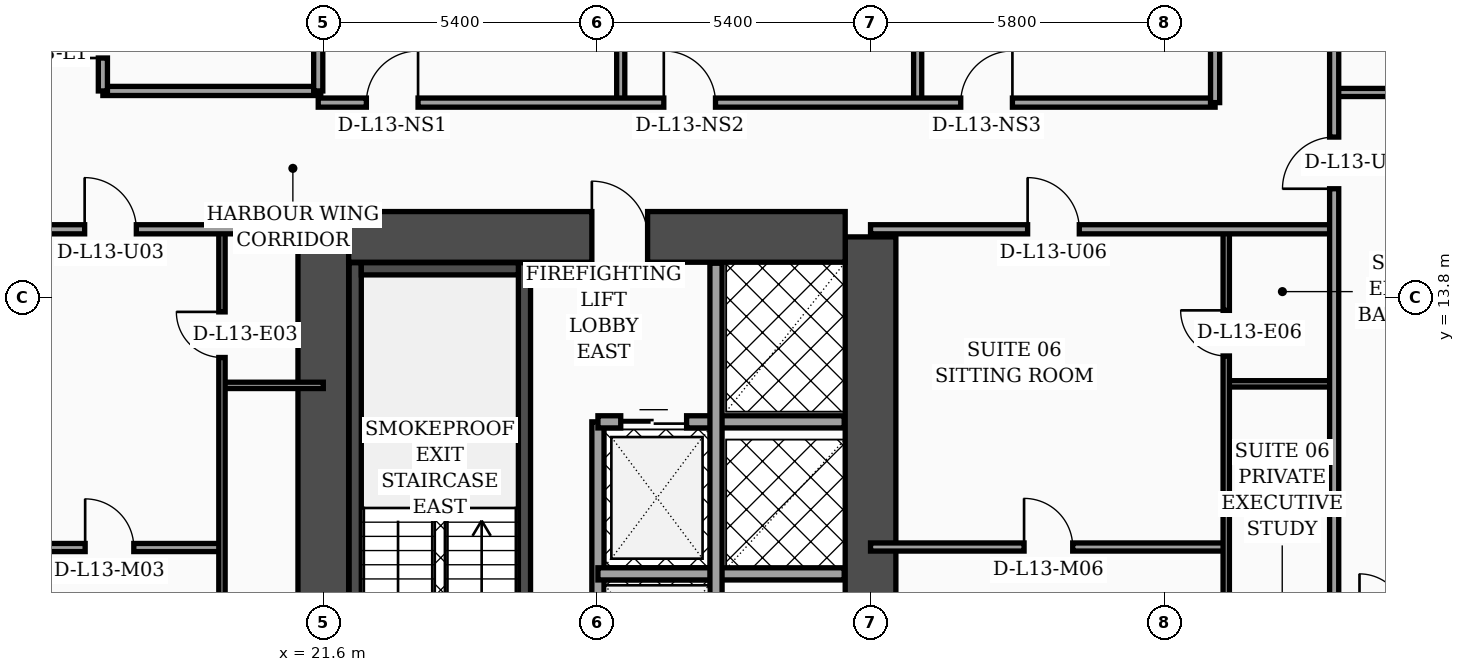
"""IFC4 building model, lengths in metres.
Left out: names, types, materials, properties, quantities, classifications, styles, units other than length and angle.
Written with IfcOpenShell. Run it as: python <this file> out.ifc"""

import sys

from ifc_helpers import new_model, si_unit, direction, frame, frame_2d, origin, place, context, subcontext, project, spatial, rectangle, extrude, element, fill, save


model = new_model("IFC4")
c1 = context("Model", 3, precision=1e-05, world=origin(), true_north=direction((0.0, 1.0)))
c2 = subcontext(c1, "Body", "Model", "MODEL_VIEW")
j1 = project(units=[si_unit("LENGTHUNIT", "METRE"), si_unit("PLANEANGLEUNIT", "RADIAN")], contexts=[c1])
p1 = place(None, origin())
s1 = spatial("IfcSite", under=j1, at=p1, CompositionType="ELEMENT")
p2 = place(p1, origin())
s2 = spatial("IfcBuilding", under=s1, at=p2, CompositionType="ELEMENT")
p3 = place(p2, frame((0.0, 0.0, 58.4)))
s3 = spatial("IfcBuildingStorey", under=s2, at=p3, CompositionType="ELEMENT", Elevation=58.4)
for number, where, z_axis, x_axis in (
    (1, (21.6, 4.6, 0.0), (0.0, 0.0, 1.0), (0.0, 1.0, 0.0)),
    (2, (32.4, 4.6, 0.0), (0.0, 0.0, 1.0), (0.0, 1.0, 0.0)),
):
    element("IfcWall", number, at=place(p3, frame(where, z_axis=z_axis, x_axis=x_axis)), inside=s3, PredefinedType="SHEAR", context=c2, shape_type="SweptSolid", body=[
        extrude(rectangle(XDim=10.4, YDim=1.0, at=frame_2d((5.2, 0.0))), origin(), (0.0, 0.0, 1.0), 3.56),
    ])
p4 = place(p3, frame((22.1, 15.0, 0.0), z_axis=(0.0, 0.0, 1.0), x_axis=(1.0, 0.0, 0.0)))
e3 = element("IfcWall", 3, at=p4, inside=s3, PredefinedType="SHEAR", context=c2, shape_type="SweptSolid", body=[
    extrude(rectangle(XDim=9.8, YDim=1.0, at=frame_2d((4.9, 0.0))), origin(), (0.0, 0.0, 1.0), 3.56),
])
p5 = place(p4, frame((4.8, 0.0, 0.0)))
e4 = element("IfcOpeningElement", 4, at=p5, cuts=e3, PredefinedType="OPENING", context=c2, shape_type="SweptSolid", body=[
    extrude(rectangle(XDim=1.1, YDim=2.2, at=frame_2d((0.55, 1.1))), frame((0.0, 0.51, 0.0), z_axis=(0.0, -1.0, 0.0), x_axis=(1.0, 0.0, 0.0)), (0.0, 0.0, 1.0), 1.02),
])
p6 = place(p3, frame((22.23, 5.1, 0.0), z_axis=(0.0, 0.0, 1.0), x_axis=(0.0, 1.0, 0.0)))
e5 = element("IfcWall", 5, at=p6, inside=s3, PredefinedType="SOLIDWALL", context=c2, shape_type="SweptSolid", body=[
    extrude(rectangle(XDim=9.39, YDim=0.24, at=frame_2d((4.695, 0.0))), origin(), (0.0, 0.0, 1.0), 3.56),
])
p7 = place(p3, frame((25.57, 5.1, 0.0), z_axis=(0.0, 0.0, 1.0), x_axis=(0.0, 1.0, 0.0)))
e6 = element("IfcWall", 6, at=p7, inside=s3, PredefinedType="SOLIDWALL", context=c2, shape_type="SweptSolid", body=[
    extrude(rectangle(XDim=9.39, YDim=0.24, at=frame_2d((4.695, 0.0))), origin(), (0.0, 0.0, 1.0), 3.56),
])
p8 = place(p7, frame((0.35, 0.0, 0.0)))
e7 = element("IfcOpeningElement", 7, at=p8, cuts=e6, PredefinedType="OPENING", context=c2, shape_type="SweptSolid", body=[
    extrude(rectangle(XDim=1.15, YDim=2.2, at=frame_2d((0.575, 1.1))), frame((0.0, 0.13, 0.0), z_axis=(0.0, -1.0, 0.0), x_axis=(1.0, 0.0, 0.0)), (0.0, 0.0, 1.0), 0.26),
])
p9 = place(p3, frame((22.35, 14.37, 0.0), z_axis=(0.0, 0.0, 1.0), x_axis=(1.0, 0.0, 0.0)))
e8 = element("IfcWall", 8, at=p9, inside=s3, PredefinedType="SOLIDWALL", context=c2, shape_type="SweptSolid", body=[
    extrude(rectangle(XDim=3.1, YDim=0.24, at=frame_2d((1.55, 0.0))), origin(), (0.0, 0.0, 1.0), 3.56),
])
p10 = place(p3, frame((27.02, 5.12, 0.0), z_axis=(0.0, 0.0, 1.0), x_axis=(0.0, 1.0, 0.0)))
e9 = element("IfcWall", 9, at=p10, inside=s3, PredefinedType="SOLIDWALL", context=c2, shape_type="SweptSolid", body=[
    extrude(rectangle(XDim=6.23, YDim=0.24, at=frame_2d((3.115, 0.0))), origin(), (0.0, 0.0, 1.0), 3.56),
])
p11 = place(p3, frame((27.02, 11.35, 0.0), z_axis=(0.0, 0.0, 1.0), x_axis=(1.0, 0.0, 0.0)))
e10 = element("IfcWall", 10, at=p11, inside=s3, PredefinedType="SOLIDWALL", context=c2, shape_type="SweptSolid", body=[
    extrude(rectangle(XDim=4.86, YDim=0.24, at=frame_2d((2.43, 0.0))), origin(), (0.0, 0.0, 1.0), 3.56),
])
p12 = place(p11, frame((0.45, 0.0, 0.0)))
e11 = element("IfcOpeningElement", 11, at=p12, cuts=e10, PredefinedType="OPENING", context=c2, shape_type="SweptSolid", body=[
    extrude(rectangle(XDim=1.3, YDim=2.35, at=frame_2d((0.65, 1.175))), frame((0.0, 0.13, 0.0), z_axis=(0.0, -1.0, 0.0), x_axis=(1.0, 0.0, 0.0)), (0.0, 0.0, 1.0), 0.26),
])
p13 = place(p3, frame((27.02, 8.35, 0.0), z_axis=(0.0, 0.0, 1.0), x_axis=(1.0, 0.0, 0.0)))
e12 = element("IfcWall", 12, at=p13, inside=s3, PredefinedType="SOLIDWALL", context=c2, shape_type="SweptSolid", body=[
    extrude(rectangle(XDim=4.86, YDim=0.24, at=frame_2d((2.43, 0.0))), origin(), (0.0, 0.0, 1.0), 3.56),
])
p14 = place(p3, frame((29.35, 5.12, 0.0), z_axis=(0.0, 0.0, 1.0), x_axis=(0.0, 1.0, 0.0)))
e13 = element("IfcWall", 13, at=p14, inside=s3, PredefinedType="SOLIDWALL", context=c2, shape_type="SweptSolid", body=[
    extrude(rectangle(XDim=9.36, YDim=0.24, at=frame_2d((4.68, 0.0))), origin(), (0.0, 0.0, 1.0), 3.56),
])
p15 = place(p14, frame((0.55, 0.0, 0.0)))
e14 = element("IfcOpeningElement", 14, at=p15, cuts=e13, PredefinedType="OPENING", context=c2, shape_type="SweptSolid", body=[
    extrude(rectangle(XDim=1.3, YDim=2.35, at=frame_2d((0.65, 1.175))), frame((0.0, 0.13, 0.0), z_axis=(0.0, -1.0, 0.0), x_axis=(1.0, 0.0, 0.0)), (0.0, 0.0, 1.0), 0.26),
])
p16 = place(p3, frame((19.6, 12.07, 0.0), z_axis=(0.0, 0.0, 1.0), x_axis=(1.0, 0.0, 0.0)))
e15 = element("IfcWall", 15, at=p16, inside=s3, PredefinedType="PARTITIONING", context=c2, shape_type="SweptSolid", body=[
    extrude(rectangle(XDim=2.0, YDim=0.125, at=frame_2d((1.0, 0.0))), origin(), (0.0, 0.0, 1.0), 3.56),
])
p17 = place(p3, frame((15.15, 8.87, 0.0), z_axis=(0.0, 0.0, 1.0), x_axis=(1.0, 0.0, 0.0)))
e16 = element("IfcWall", 16, at=p17, inside=s3, PredefinedType="PARTITIONING", context=c2, shape_type="SweptSolid", body=[
    extrude(rectangle(XDim=4.45, YDim=0.16, at=frame_2d((2.225, 0.0))), origin(), (0.0, 0.0, 1.0), 3.56),
])
p18 = place(p17, frame((1.75, 0.0, 0.0)))
e17 = element("IfcOpeningElement", 17, at=p18, cuts=e16, PredefinedType="OPENING", context=c2, shape_type="SweptSolid", body=[
    extrude(rectangle(XDim=0.96, YDim=2.2, at=frame_2d((0.48, 1.1))), frame((0.0, 0.09, 0.0), z_axis=(0.0, -1.0, 0.0), x_axis=(1.0, 0.0, 0.0)), (0.0, 0.0, 1.0), 0.18),
])
p19 = place(p3, frame((19.6, 2.44, 0.0), z_axis=(0.0, 0.0, 1.0), x_axis=(0.0, 1.0, 0.0)))
e18 = element("IfcWall", 18, at=p19, inside=s3, PredefinedType="PARTITIONING", context=c2, shape_type="SweptSolid", body=[
    extrude(rectangle(XDim=12.71, YDim=0.125, at=frame_2d((6.355, 0.0))), origin(), (0.0, 0.0, 1.0), 2.34),
])
p20 = place(p19, frame((4.34, 0.0, 0.0)))
e19 = element("IfcOpeningElement", 19, at=p20, cuts=e18, PredefinedType="OPENING", context=c2, shape_type="SweptSolid", body=[
    extrude(rectangle(XDim=0.96, YDim=2.2, at=frame_2d((0.48, 1.1))), frame((0.0, 0.073, 0.0), z_axis=(0.0, -1.0, 0.0), x_axis=(1.0, 0.0, 0.0)), (0.0, 0.0, 1.0), 0.145),
])
p21 = place(p19, frame((10.18, 0.0, 0.0)))
e20 = element("IfcOpeningElement", 20, at=p21, cuts=e18, PredefinedType="OPENING", context=c2, shape_type="SweptSolid", body=[
    extrude(rectangle(XDim=0.9, YDim=2.15, at=frame_2d((0.45, 1.075))), frame((0.0, 0.073, 0.0), z_axis=(0.0, -1.0, 0.0), x_axis=(1.0, 0.0, 0.0)), (0.0, 0.0, 1.0), 0.145),
])
p22 = place(p3, frame((15.15, 15.15, 0.0), z_axis=(0.0, 0.0, 1.0), x_axis=(1.0, 0.0, 0.0)))
e21 = element("IfcWall", 21, at=p22, inside=s3, PredefinedType="PARTITIONING", context=c2, shape_type="SweptSolid", body=[
    extrude(rectangle(XDim=6.45, YDim=0.18, at=frame_2d((3.225, 0.0))), origin(), (0.0, 0.0, 1.0), 2.34),
])
p23 = place(p22, frame((1.74, 0.0, 0.0)))
e22 = element("IfcOpeningElement", 22, at=p23, cuts=e21, PredefinedType="OPENING", context=c2, shape_type="SweptSolid", body=[
    extrude(rectangle(XDim=1.02, YDim=2.2, at=frame_2d((0.51, 1.1))), frame((0.0, 0.1, 0.0), z_axis=(0.0, -1.0, 0.0), x_axis=(1.0, 0.0, 0.0)), (0.0, 0.0, 1.0), 0.2),
])
p24 = place(p3, frame((17.25, 17.88, 0.0), z_axis=(0.0, 0.0, 1.0), x_axis=(1.0, 0.0, 0.0)))
e23 = element("IfcWall", 23, at=p24, inside=s3, PredefinedType="PARTITIONING", context=c2, shape_type="SweptSolid", body=[
    extrude(rectangle(XDim=4.3, YDim=0.18, at=frame_2d((2.15, 0.0))), origin(), (0.0, 0.0, 1.0), 3.09),
])
p25 = place(p3, frame((21.5, 17.88, 0.0), z_axis=(0.0, 0.0, 1.0), x_axis=(0.0, 1.0, 0.0)))
e24 = element("IfcWall", 24, at=p25, inside=s3, PredefinedType="PARTITIONING", context=c2, shape_type="SweptSolid", body=[
    extrude(rectangle(XDim=6.44, YDim=0.18, at=frame_2d((3.22, 0.0))), origin(), (0.0, 0.0, 1.0), 3.09),
])
p26 = place(p3, frame((17.25, 17.88, 0.0), z_axis=(0.0, 0.0, 1.0), x_axis=(0.0, 1.0, 0.0)))
e25 = element("IfcWall", 25, at=p26, inside=s3, PredefinedType="PARTITIONING", context=c2, shape_type="SweptSolid", body=[
    extrude(rectangle(XDim=6.44, YDim=0.18, at=frame_2d((3.22, 0.0))), origin(), (0.0, 0.0, 1.0), 3.09),
])
p27 = place(p26, frame((0.65, 0.0, 0.0)))
e26 = element("IfcOpeningElement", 26, at=p27, cuts=e25, PredefinedType="OPENING", context=c2, shape_type="SweptSolid", body=[
    extrude(rectangle(XDim=0.98, YDim=2.15, at=frame_2d((0.49, 1.075))), frame((0.0, 0.1, 0.0), z_axis=(0.0, -1.0, 0.0), x_axis=(1.0, 0.0, 0.0)), (0.0, 0.0, 1.0), 0.2),
])
p28 = place(p26, frame((3.27, 0.0, 0.0)))
e27 = element("IfcOpeningElement", 27, at=p28, cuts=e25, PredefinedType="OPENING", context=c2, shape_type="SweptSolid", body=[
    extrude(rectangle(XDim=0.96, YDim=2.2, at=frame_2d((0.48, 1.1))), frame((0.0, 0.1, 0.0), z_axis=(0.0, -1.0, 0.0), x_axis=(1.0, 0.0, 0.0)), (0.0, 0.0, 1.0), 0.2),
])
p29 = place(p3, frame((39.42, 12.1, 0.0), z_axis=(0.0, 0.0, 1.0), x_axis=(1.0, 0.0, 0.0)))
e28 = element("IfcWall", 28, at=p29, inside=s3, PredefinedType="PARTITIONING", context=c2, shape_type="SweptSolid", body=[
    extrude(rectangle(XDim=2.13, YDim=0.125, at=frame_2d((1.065, 0.0))), origin(), (0.0, 0.0, 1.0), 3.56),
])
p30 = place(p3, frame((32.4, 8.88, 0.0), z_axis=(0.0, 0.0, 1.0), x_axis=(1.0, 0.0, 0.0)))
e29 = element("IfcWall", 29, at=p30, inside=s3, PredefinedType="PARTITIONING", context=c2, shape_type="SweptSolid", body=[
    extrude(rectangle(XDim=7.02, YDim=0.16, at=frame_2d((3.51, 0.0))), origin(), (0.0, 0.0, 1.0), 2.84),
])
p31 = place(p30, frame((3.03, 0.0, 0.0)))
e30 = element("IfcOpeningElement", 30, at=p31, cuts=e29, PredefinedType="OPENING", context=c2, shape_type="SweptSolid", body=[
    extrude(rectangle(XDim=0.96, YDim=2.2, at=frame_2d((0.48, 1.1))), frame((0.0, 0.09, 0.0), z_axis=(0.0, -1.0, 0.0), x_axis=(1.0, 0.0, 0.0)), (0.0, 0.0, 1.0), 0.18),
])
p32 = place(p3, frame((39.42, 2.44, 0.0), z_axis=(0.0, 0.0, 1.0), x_axis=(0.0, 1.0, 0.0)))
e31 = element("IfcWall", 31, at=p32, inside=s3, PredefinedType="PARTITIONING", context=c2, shape_type="SweptSolid", body=[
    extrude(rectangle(XDim=12.71, YDim=0.125, at=frame_2d((6.355, 0.0))), origin(), (0.0, 0.0, 1.0), 2.84),
])
p33 = place(p32, frame((4.35, 0.0, 0.0)))
e32 = element("IfcOpeningElement", 32, at=p33, cuts=e31, PredefinedType="OPENING", context=c2, shape_type="SweptSolid", body=[
    extrude(rectangle(XDim=0.96, YDim=2.2, at=frame_2d((0.48, 1.1))), frame((0.0, 0.073, 0.0), z_axis=(0.0, -1.0, 0.0), x_axis=(1.0, 0.0, 0.0)), (0.0, 0.0, 1.0), 0.145),
])
p34 = place(p32, frame((10.21, 0.0, 0.0)))
e33 = element("IfcOpeningElement", 33, at=p34, cuts=e31, PredefinedType="OPENING", context=c2, shape_type="SweptSolid", body=[
    extrude(rectangle(XDim=0.9, YDim=2.15, at=frame_2d((0.45, 1.075))), frame((0.0, 0.073, 0.0), z_axis=(0.0, -1.0, 0.0), x_axis=(1.0, 0.0, 0.0)), (0.0, 0.0, 1.0), 0.145),
])
p35 = place(p3, frame((32.4, 15.15, 0.0), z_axis=(0.0, 0.0, 1.0), x_axis=(1.0, 0.0, 0.0)))
e34 = element("IfcWall", 34, at=p35, inside=s3, PredefinedType="PARTITIONING", context=c2, shape_type="SweptSolid", body=[
    extrude(rectangle(XDim=9.15, YDim=0.18, at=frame_2d((4.575, 0.0))), origin(), (0.0, 0.0, 1.0), 2.84),
])
p36 = place(p35, frame((3.1, 0.0, 0.0)))
e35 = element("IfcOpeningElement", 35, at=p36, cuts=e34, PredefinedType="OPENING", context=c2, shape_type="SweptSolid", body=[
    extrude(rectangle(XDim=1.02, YDim=2.2, at=frame_2d((0.51, 1.1))), frame((0.0, 0.1, 0.0), z_axis=(0.0, -1.0, 0.0), x_axis=(1.0, 0.0, 0.0)), (0.0, 0.0, 1.0), 0.2),
])
p37 = place(p3, frame((27.47, 17.65, 0.0), z_axis=(0.0, 0.0, 1.0), x_axis=(0.0, 1.0, 0.0)))
e36 = element("IfcWall", 36, at=p37, inside=s3, PredefinedType="PARTITIONING", context=c2, shape_type="SweptSolid", body=[
    extrude(rectangle(XDim=9.6, YDim=0.16, at=frame_2d((4.8, 0.0))), origin(), (0.0, 0.0, 1.0), 2.84),
])
p38 = place(p3, frame((33.33, 17.65, 0.0), z_axis=(0.0, 0.0, 1.0), x_axis=(0.0, 1.0, 0.0)))
e37 = element("IfcWall", 37, at=p38, inside=s3, PredefinedType="PARTITIONING", context=c2, shape_type="SweptSolid", body=[
    extrude(rectangle(XDim=12.37, YDim=0.16, at=frame_2d((6.185, 0.0))), origin(), (0.0, 0.0, 1.0), 2.84),
])
p39 = place(p3, frame((21.5, 17.65, 0.0), z_axis=(0.0, 0.0, 1.0), x_axis=(1.0, 0.0, 0.0)))
e38 = element("IfcWall", 38, at=p39, inside=s3, PredefinedType="PARTITIONING", context=c2, shape_type="SweptSolid", body=[
    extrude(rectangle(XDim=17.7, YDim=0.18, at=frame_2d((8.85, 0.0))), origin(), (0.0, 0.0, 1.0), 2.84),
])
p40 = place(p39, frame((0.95, 0.0, 0.0)))
e39 = element("IfcOpeningElement", 39, at=p40, cuts=e38, PredefinedType="OPENING", context=c2, shape_type="SweptSolid", body=[
    extrude(rectangle(XDim=1.02, YDim=2.2, at=frame_2d((0.51, 1.1))), frame((0.0, 0.1, 0.0), z_axis=(0.0, -1.0, 0.0), x_axis=(1.0, 0.0, 0.0)), (0.0, 0.0, 1.0), 0.2),
])
p41 = place(p39, frame((6.82, 0.0, 0.0)))
e40 = element("IfcOpeningElement", 40, at=p41, cuts=e38, PredefinedType="OPENING", context=c2, shape_type="SweptSolid", body=[
    extrude(rectangle(XDim=1.02, YDim=2.2, at=frame_2d((0.51, 1.1))), frame((0.0, 0.1, 0.0), z_axis=(0.0, -1.0, 0.0), x_axis=(1.0, 0.0, 0.0)), (0.0, 0.0, 1.0), 0.2),
])
p42 = place(p39, frame((12.68, 0.0, 0.0)))
e41 = element("IfcOpeningElement", 41, at=p42, cuts=e38, PredefinedType="OPENING", context=c2, shape_type="SweptSolid", body=[
    extrude(rectangle(XDim=1.02, YDim=2.2, at=frame_2d((0.51, 1.1))), frame((0.0, 0.1, 0.0), z_axis=(0.0, -1.0, 0.0), x_axis=(1.0, 0.0, 0.0)), (0.0, 0.0, 1.0), 0.2),
])
p43 = place(p3, frame((39.2, 17.65, 0.0), z_axis=(0.0, 0.0, 1.0), x_axis=(0.0, 1.0, 0.0)))
e42 = element("IfcWall", 42, at=p43, inside=s3, PredefinedType="PARTITIONING", context=c2, shape_type="SweptSolid", body=[
    extrude(rectangle(XDim=15.14, YDim=0.18, at=frame_2d((7.57, 0.0))), origin(), (0.0, 0.0, 1.0), 2.84),
])
p44 = place(p3, frame((41.55, 17.85, 0.0), z_axis=(0.0, 0.0, 1.0), x_axis=(1.0, 0.0, 0.0)))
e43 = element("IfcWall", 43, at=p44, inside=s3, PredefinedType="PARTITIONING", context=c2, shape_type="SweptSolid", body=[
    extrude(rectangle(XDim=18.13, YDim=0.16, at=frame_2d((9.065, 0.0))), origin(), (0.0, 0.0, 1.0), 2.84),
])
p45 = place(p3, frame((41.55, 2.44, 0.0), z_axis=(0.0, 0.0, 1.0), x_axis=(0.0, 1.0, 0.0)))
e44 = element("IfcWall", 44, at=p45, inside=s3, PredefinedType="PARTITIONING", context=c2, shape_type="SweptSolid", body=[
    extrude(rectangle(XDim=31.04, YDim=0.18, at=frame_2d((15.52, 0.0))), origin(), (0.0, 0.0, 1.0), 2.84),
])
p46 = place(p45, frame((13.51, 0.0, 0.0)))
e45 = element("IfcOpeningElement", 45, at=p46, cuts=e44, PredefinedType="OPENING", context=c2, shape_type="SweptSolid", body=[
    extrude(rectangle(XDim=1.02, YDim=2.2, at=frame_2d((0.51, 1.1))), frame((0.0, 0.1, 0.0), z_axis=(0.0, -1.0, 0.0), x_axis=(1.0, 0.0, 0.0)), (0.0, 0.0, 1.0), 0.2),
])
p47 = place(p45, frame((17.77, 0.0, 0.0)))
e46 = element("IfcOpeningElement", 46, at=p47, cuts=e44, PredefinedType="OPENING", context=c2, shape_type="SweptSolid", body=[
    extrude(rectangle(XDim=1.02, YDim=2.2, at=frame_2d((0.51, 1.1))), frame((0.0, 0.1, 0.0), z_axis=(0.0, -1.0, 0.0), x_axis=(1.0, 0.0, 0.0)), (0.0, 0.0, 1.0), 0.2),
])
p48 = place(p45, frame((25.58, 0.0, 0.0)))
e47 = element("IfcOpeningElement", 47, at=p48, cuts=e44, PredefinedType="OPENING", context=c2, shape_type="SweptSolid", body=[
    extrude(rectangle(XDim=1.02, YDim=2.2, at=frame_2d((0.51, 1.1))), frame((0.0, 0.1, 0.0), z_axis=(0.0, -1.0, 0.0), x_axis=(1.0, 0.0, 0.0)), (0.0, 0.0, 1.0), 0.2),
])
p49 = place(p12, origin())
e48 = element("IfcDoor", 48, at=p49, inside=s3, OperationType="DOUBLE_DOOR_SLIDING", PredefinedType="DOOR", context=c2, shape_type="SweptSolid", body=[
    extrude(rectangle(XDim=1.3, YDim=2.35, at=frame_2d((0.65, 1.175))), frame((0.0, 0.025, 0.0), z_axis=(0.0, -1.0, 0.0), x_axis=(1.0, 0.0, 0.0)), (0.0, 0.0, 1.0), 0.05),
])
fill(e11, e48)
p50 = place(p18, origin())
e49 = element("IfcDoor", 49, at=p50, inside=s3, OperationType="SINGLE_SWING_LEFT", PredefinedType="DOOR", context=c2, shape_type="SweptSolid", body=[
    extrude(rectangle(XDim=0.96, YDim=2.2, at=frame_2d((0.48, 1.1))), frame((0.0, 0.025, 0.0), z_axis=(0.0, -1.0, 0.0), x_axis=(1.0, 0.0, 0.0)), (0.0, 0.0, 1.0), 0.05),
])
fill(e17, e49)
p51 = place(p21, origin())
e50 = element("IfcDoor", 50, at=p51, inside=s3, OperationType="SINGLE_SWING_RIGHT", PredefinedType="DOOR", context=c2, shape_type="SweptSolid", body=[
    extrude(rectangle(XDim=0.9, YDim=2.15, at=frame_2d((0.45, 1.075))), frame((0.0, 0.025, 0.0), z_axis=(0.0, -1.0, 0.0), x_axis=(1.0, 0.0, 0.0)), (0.0, 0.0, 1.0), 0.05),
])
fill(e20, e50)
p52 = place(p23, origin())
e51 = element("IfcDoor", 51, at=p52, inside=s3, OperationType="SINGLE_SWING_LEFT", PredefinedType="DOOR", context=c2, shape_type="SweptSolid", body=[
    extrude(rectangle(XDim=1.02, YDim=2.2, at=frame_2d((0.51, 1.1))), frame((0.0, 0.025, 0.0), z_axis=(0.0, -1.0, 0.0), x_axis=(1.0, 0.0, 0.0)), (0.0, 0.0, 1.0), 0.05),
])
fill(e22, e51)
p53 = place(p27, origin())
e52 = element("IfcDoor", 52, at=p53, inside=s3, OperationType="SINGLE_SWING_LEFT", PredefinedType="DOOR", context=c2, shape_type="SweptSolid", body=[
    extrude(rectangle(XDim=0.98, YDim=2.15, at=frame_2d((0.49, 1.075))), frame((0.0, 0.025, 0.0), z_axis=(0.0, -1.0, 0.0), x_axis=(1.0, 0.0, 0.0)), (0.0, 0.0, 1.0), 0.05),
])
fill(e26, e52)
p54 = place(p31, origin())
e53 = element("IfcDoor", 53, at=p54, inside=s3, OperationType="SINGLE_SWING_LEFT", PredefinedType="DOOR", context=c2, shape_type="SweptSolid", body=[
    extrude(rectangle(XDim=0.96, YDim=2.2, at=frame_2d((0.48, 1.1))), frame((0.0, 0.025, 0.0), z_axis=(0.0, -1.0, 0.0), x_axis=(1.0, 0.0, 0.0)), (0.0, 0.0, 1.0), 0.05),
])
fill(e30, e53)
p55 = place(p34, origin())
e54 = element("IfcDoor", 54, at=p55, inside=s3, OperationType="SINGLE_SWING_RIGHT", PredefinedType="DOOR", context=c2, shape_type="SweptSolid", body=[
    extrude(rectangle(XDim=0.9, YDim=2.15, at=frame_2d((0.45, 1.075))), frame((0.0, 0.025, 0.0), z_axis=(0.0, -1.0, 0.0), x_axis=(1.0, 0.0, 0.0)), (0.0, 0.0, 1.0), 0.05),
])
fill(e33, e54)
p56 = place(p36, origin())
e55 = element("IfcDoor", 55, at=p56, inside=s3, OperationType="SINGLE_SWING_LEFT", PredefinedType="DOOR", context=c2, shape_type="SweptSolid", body=[
    extrude(rectangle(XDim=1.02, YDim=2.2, at=frame_2d((0.51, 1.1))), frame((0.0, 0.025, 0.0), z_axis=(0.0, -1.0, 0.0), x_axis=(1.0, 0.0, 0.0)), (0.0, 0.0, 1.0), 0.05),
])
fill(e35, e55)
p57 = place(p40, origin())
e56 = element("IfcDoor", 56, at=p57, inside=s3, OperationType="SINGLE_SWING_RIGHT", PredefinedType="DOOR", context=c2, shape_type="SweptSolid", body=[
    extrude(rectangle(XDim=1.02, YDim=2.2, at=frame_2d((0.51, 1.1))), frame((0.0, 0.025, 0.0), z_axis=(0.0, -1.0, 0.0), x_axis=(1.0, 0.0, 0.0)), (0.0, 0.0, 1.0), 0.05),
])
fill(e39, e56)
p58 = place(p41, origin())
e57 = element("IfcDoor", 57, at=p58, inside=s3, OperationType="SINGLE_SWING_LEFT", PredefinedType="DOOR", context=c2, shape_type="SweptSolid", body=[
    extrude(rectangle(XDim=1.02, YDim=2.2, at=frame_2d((0.51, 1.1))), frame((0.0, 0.025, 0.0), z_axis=(0.0, -1.0, 0.0), x_axis=(1.0, 0.0, 0.0)), (0.0, 0.0, 1.0), 0.05),
])
fill(e40, e57)
p59 = place(p42, origin())
e58 = element("IfcDoor", 58, at=p59, inside=s3, OperationType="SINGLE_SWING_RIGHT", PredefinedType="DOOR", context=c2, shape_type="SweptSolid", body=[
    extrude(rectangle(XDim=1.02, YDim=2.2, at=frame_2d((0.51, 1.1))), frame((0.0, 0.025, 0.0), z_axis=(0.0, -1.0, 0.0), x_axis=(1.0, 0.0, 0.0)), (0.0, 0.0, 1.0), 0.05),
])
fill(e41, e58)
p60 = place(p46, origin())
e59 = element("IfcDoor", 59, at=p60, inside=s3, OperationType="SINGLE_SWING_LEFT", PredefinedType="DOOR", context=c2, shape_type="SweptSolid", body=[
    extrude(rectangle(XDim=1.02, YDim=2.2, at=frame_2d((0.51, 1.1))), frame((0.0, 0.025, 0.0), z_axis=(0.0, -1.0, 0.0), x_axis=(1.0, 0.0, 0.0)), (0.0, 0.0, 1.0), 0.05),
])
fill(e45, e59)
p61 = place(p5, origin())
e60 = element("IfcDoor", 60, at=p61, inside=s3, OperationType="SINGLE_SWING_LEFT", PredefinedType="DOOR", context=c2, shape_type="SweptSolid", body=[
    extrude(rectangle(XDim=1.1, YDim=2.2, at=frame_2d((0.55, 1.1))), frame((0.0, 0.025, 0.0), z_axis=(0.0, -1.0, 0.0), x_axis=(1.0, 0.0, 0.0)), (0.0, 0.0, 1.0), 0.05),
])
fill(e4, e60)
save(model, sys.argv[1])
